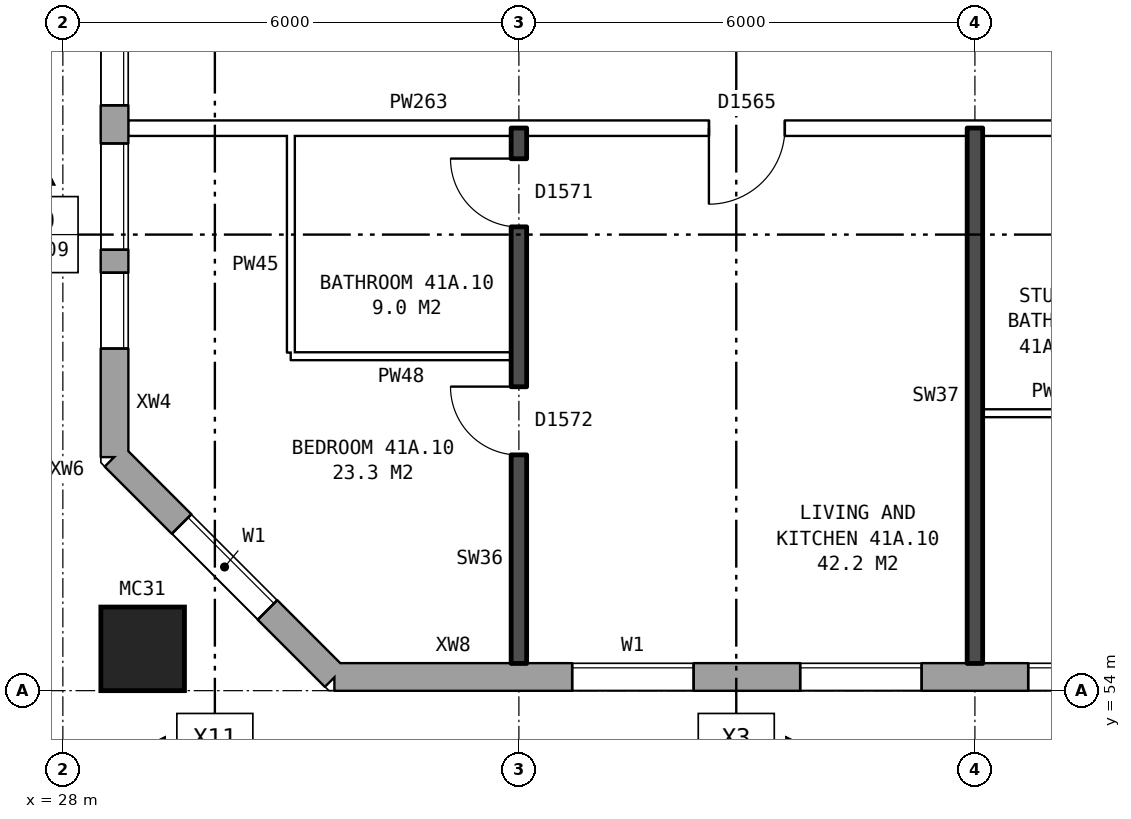
"""IFC4 building model, lengths in metres.
Left out: names, types, materials, properties, quantities, classifications, styles, units other than length and angle.
Written with IfcOpenShell. Run it as: python <this file> out.ifc"""

import sys

from ifc_helpers import new_model, si_unit, direction, frame, frame_2d, origin, origin_2d, place, context, subcontext, project, spatial, rectangle, hollow_rectangle, extrude, element, fill, save


model = new_model("IFC4")
c1 = context("Model", 3, precision=1e-05, world=origin(), true_north=direction((0.0, 1.0)))
c2 = subcontext(c1, "Body", "Model", "MODEL_VIEW")
j1 = project(units=[si_unit("LENGTHUNIT", "METRE"), si_unit("PLANEANGLEUNIT", "RADIAN")], contexts=[c1])
p1 = place(None, origin())
s1 = spatial("IfcSite", under=j1, at=p1, CompositionType="ELEMENT")
p2 = place(p1, origin())
s2 = spatial("IfcBuilding", under=s1, at=p2, CompositionType="ELEMENT")
p3 = place(p2, frame((0.0, 0.0, 148.5)))
s3 = spatial("IfcBuildingStorey", under=s2, at=p3, CompositionType="ELEMENT", Elevation=148.5)
p4 = place(p3, frame((29.05, 54.55, 0.0), z_axis=(0.0, 0.0, 1.0), x_axis=(1.0, 0.0, 0.0)))
e1 = element("IfcColumn", 1, at=p4, inside=s3, PredefinedType="COLUMN", context=c2, shape_type="SweptSolid", body=[
    extrude(hollow_rectangle(XDim=1.1, YDim=1.1, WallThickness=0.06, at=origin_2d()), origin(), (0.0, 0.0, 1.0), 3.1),
])
p5 = place(p3, frame((28.68, 57.075, 0.0), z_axis=(0.0, 0.0, 1.0), x_axis=(0.707106781187, -0.707106781187, 0.0)))
e2 = element("IfcWall", 2, at=p5, inside=s3, PredefinedType="STANDARD", context=c2, shape_type="SweptSolid", body=[
    extrude(rectangle(XDim=4.094, YDim=0.36, at=frame_2d((2.047, 0.0))), origin(), (0.0, 0.0, 1.0), 2.85),
])
p6 = place(p5, frame((1.247, 0.0, 0.8)))
e3 = element("IfcOpeningElement", 3, at=p6, cuts=e2, PredefinedType="OPENING", context=c2, shape_type="SweptSolid", body=[
    extrude(rectangle(XDim=1.6, YDim=1.8, at=frame_2d((0.8, 0.9))), frame((0.0, 0.19, 0.0), z_axis=(0.0, -1.0, 0.0), x_axis=(1.0, 0.0, 0.0)), (0.0, 0.0, 1.0), 0.38),
])
p7 = place(p3, frame((31.575, 54.18, 0.0), z_axis=(0.0, 0.0, 1.0), x_axis=(1.0, 0.0, 0.0)))
e4 = element("IfcWall", 4, at=p7, inside=s3, PredefinedType="STANDARD", context=c2, shape_type="SweptSolid", body=[
    extrude(rectangle(XDim=41.351, YDim=0.36, at=frame_2d((20.675, 0.0))), origin(), (0.0, 0.0, 1.0), 2.85),
])
p8 = place(p7, frame((3.125, 0.0, 0.8)))
e5 = element("IfcOpeningElement", 5, at=p8, cuts=e4, PredefinedType="OPENING", context=c2, shape_type="SweptSolid", body=[
    extrude(rectangle(XDim=1.6, YDim=1.8, at=frame_2d((0.8, 0.9))), frame((0.0, 0.19, 0.0), z_axis=(0.0, -1.0, 0.0), x_axis=(1.0, 0.0, 0.0)), (0.0, 0.0, 1.0), 0.38),
])
p9 = place(p7, frame((6.125, 0.0, 0.8)))
e6 = element("IfcOpeningElement", 6, at=p9, cuts=e4, PredefinedType="OPENING", context=c2, shape_type="SweptSolid", body=[
    extrude(rectangle(XDim=1.6, YDim=1.8, at=frame_2d((0.8, 0.9))), frame((0.0, 0.19, 0.0), z_axis=(0.0, -1.0, 0.0), x_axis=(1.0, 0.0, 0.0)), (0.0, 0.0, 1.0), 0.38),
])
p10 = place(p7, frame((9.125, 0.0, 0.8)))
e7 = element("IfcOpeningElement", 7, at=p10, cuts=e4, PredefinedType="OPENING", context=c2, shape_type="SweptSolid", body=[
    extrude(rectangle(XDim=1.6, YDim=1.8, at=frame_2d((0.8, 0.9))), frame((0.0, 0.19, 0.0), z_axis=(0.0, -1.0, 0.0), x_axis=(1.0, 0.0, 0.0)), (0.0, 0.0, 1.0), 0.38),
])
p11 = place(p7, frame((12.125, 0.0, 0.8)))
e8 = element("IfcOpeningElement", 8, at=p11, cuts=e4, PredefinedType="OPENING", context=c2, shape_type="SweptSolid", body=[
    extrude(rectangle(XDim=1.6, YDim=1.8, at=frame_2d((0.8, 0.9))), frame((0.0, 0.19, 0.0), z_axis=(0.0, -1.0, 0.0), x_axis=(1.0, 0.0, 0.0)), (0.0, 0.0, 1.0), 0.38),
])
p12 = place(p7, frame((15.125, 0.0, 0.8)))
e9 = element("IfcOpeningElement", 9, at=p12, cuts=e4, PredefinedType="OPENING", context=c2, shape_type="SweptSolid", body=[
    extrude(rectangle(XDim=1.6, YDim=1.8, at=frame_2d((0.8, 0.9))), frame((0.0, 0.19, 0.0), z_axis=(0.0, -1.0, 0.0), x_axis=(1.0, 0.0, 0.0)), (0.0, 0.0, 1.0), 0.38),
])
p13 = place(p7, frame((18.125, 0.0, 0.8)))
e10 = element("IfcOpeningElement", 10, at=p13, cuts=e4, PredefinedType="OPENING", context=c2, shape_type="SweptSolid", body=[
    extrude(rectangle(XDim=1.6, YDim=1.8, at=frame_2d((0.8, 0.9))), frame((0.0, 0.19, 0.0), z_axis=(0.0, -1.0, 0.0), x_axis=(1.0, 0.0, 0.0)), (0.0, 0.0, 1.0), 0.38),
])
p14 = place(p7, frame((21.125, 0.0, 0.8)))
e11 = element("IfcOpeningElement", 11, at=p14, cuts=e4, PredefinedType="OPENING", context=c2, shape_type="SweptSolid", body=[
    extrude(rectangle(XDim=1.6, YDim=1.8, at=frame_2d((0.8, 0.9))), frame((0.0, 0.19, 0.0), z_axis=(0.0, -1.0, 0.0), x_axis=(1.0, 0.0, 0.0)), (0.0, 0.0, 1.0), 0.38),
])
p15 = place(p7, frame((24.125, 0.0, 0.8)))
e12 = element("IfcOpeningElement", 12, at=p15, cuts=e4, PredefinedType="OPENING", context=c2, shape_type="SweptSolid", body=[
    extrude(rectangle(XDim=1.6, YDim=1.8, at=frame_2d((0.8, 0.9))), frame((0.0, 0.19, 0.0), z_axis=(0.0, -1.0, 0.0), x_axis=(1.0, 0.0, 0.0)), (0.0, 0.0, 1.0), 0.38),
])
p16 = place(p7, frame((27.125, 0.0, 0.8)))
e13 = element("IfcOpeningElement", 13, at=p16, cuts=e4, PredefinedType="OPENING", context=c2, shape_type="SweptSolid", body=[
    extrude(rectangle(XDim=1.6, YDim=1.8, at=frame_2d((0.8, 0.9))), frame((0.0, 0.19, 0.0), z_axis=(0.0, -1.0, 0.0), x_axis=(1.0, 0.0, 0.0)), (0.0, 0.0, 1.0), 0.38),
])
p17 = place(p7, frame((30.125, 0.0, 0.8)))
e14 = element("IfcOpeningElement", 14, at=p17, cuts=e4, PredefinedType="OPENING", context=c2, shape_type="SweptSolid", body=[
    extrude(rectangle(XDim=1.6, YDim=1.8, at=frame_2d((0.8, 0.9))), frame((0.0, 0.19, 0.0), z_axis=(0.0, -1.0, 0.0), x_axis=(1.0, 0.0, 0.0)), (0.0, 0.0, 1.0), 0.38),
])
p18 = place(p7, frame((33.125, 0.0, 0.8)))
e15 = element("IfcOpeningElement", 15, at=p18, cuts=e4, PredefinedType="OPENING", context=c2, shape_type="SweptSolid", body=[
    extrude(rectangle(XDim=1.6, YDim=1.8, at=frame_2d((0.8, 0.9))), frame((0.0, 0.19, 0.0), z_axis=(0.0, -1.0, 0.0), x_axis=(1.0, 0.0, 0.0)), (0.0, 0.0, 1.0), 0.38),
])
p19 = place(p7, frame((36.125, 0.0, 0.8)))
e16 = element("IfcOpeningElement", 16, at=p19, cuts=e4, PredefinedType="OPENING", context=c2, shape_type="SweptSolid", body=[
    extrude(rectangle(XDim=1.6, YDim=1.8, at=frame_2d((0.8, 0.9))), frame((0.0, 0.19, 0.0), z_axis=(0.0, -1.0, 0.0), x_axis=(1.0, 0.0, 0.0)), (0.0, 0.0, 1.0), 0.38),
])
p20 = place(p7, frame((38.625, 0.0, 0.8)))
e17 = element("IfcOpeningElement", 17, at=p20, cuts=e4, PredefinedType="OPENING", context=c2, shape_type="SweptSolid", body=[
    extrude(rectangle(XDim=1.2, YDim=1.8, at=frame_2d((0.6, 0.9))), frame((0.0, 0.19, 0.0), z_axis=(0.0, -1.0, 0.0), x_axis=(1.0, 0.0, 0.0)), (0.0, 0.0, 1.0), 0.38),
])
p21 = place(p7, frame((40.125, 0.0, 0.8)))
e18 = element("IfcOpeningElement", 18, at=p21, cuts=e4, PredefinedType="OPENING", context=c2, shape_type="SweptSolid", body=[
    extrude(rectangle(XDim=0.8, YDim=0.9, at=frame_2d((0.4, 0.45))), frame((0.0, 0.19, 0.0), z_axis=(0.0, -1.0, 0.0), x_axis=(1.0, 0.0, 0.0)), (0.0, 0.0, 1.0), 0.38),
])
p22 = place(p3, frame((28.68, 82.925, 0.0), z_axis=(0.0, 0.0, 1.0), x_axis=(0.0, -1.0, 0.0)))
e19 = element("IfcWall", 19, at=p22, inside=s3, PredefinedType="STANDARD", context=c2, shape_type="SweptSolid", body=[
    extrude(rectangle(XDim=25.851, YDim=0.36, at=frame_2d((12.925, 0.0))), origin(), (0.0, 0.0, 1.0), 2.85),
])
p23 = place(p22, frame((1.4, 0.0, 0.8)))
e20 = element("IfcOpeningElement", 20, at=p23, cuts=e19, PredefinedType="OPENING", context=c2, shape_type="SweptSolid", body=[
    extrude(rectangle(XDim=1.0, YDim=1.2, at=frame_2d((0.5, 0.6))), frame((0.0, 0.19, 0.0), z_axis=(0.0, -1.0, 0.0), x_axis=(1.0, 0.0, 0.0)), (0.0, 0.0, 1.0), 0.38),
])
p24 = place(p22, frame((4.625, 0.0, 0.8)))
e21 = element("IfcOpeningElement", 21, at=p24, cuts=e19, PredefinedType="OPENING", context=c2, shape_type="SweptSolid", body=[
    extrude(rectangle(XDim=1.6, YDim=1.8, at=frame_2d((0.8, 0.9))), frame((0.0, 0.19, 0.0), z_axis=(0.0, -1.0, 0.0), x_axis=(1.0, 0.0, 0.0)), (0.0, 0.0, 1.0), 0.38),
])
p25 = place(p22, frame((7.625, 0.0, 0.8)))
e22 = element("IfcOpeningElement", 22, at=p25, cuts=e19, PredefinedType="OPENING", context=c2, shape_type="SweptSolid", body=[
    extrude(rectangle(XDim=1.6, YDim=1.8, at=frame_2d((0.8, 0.9))), frame((0.0, 0.19, 0.0), z_axis=(0.0, -1.0, 0.0), x_axis=(1.0, 0.0, 0.0)), (0.0, 0.0, 1.0), 0.38),
])
p26 = place(p22, frame((10.625, 0.0, 0.8)))
e23 = element("IfcOpeningElement", 23, at=p26, cuts=e19, PredefinedType="OPENING", context=c2, shape_type="SweptSolid", body=[
    extrude(rectangle(XDim=1.6, YDim=1.8, at=frame_2d((0.8, 0.9))), frame((0.0, 0.19, 0.0), z_axis=(0.0, -1.0, 0.0), x_axis=(1.0, 0.0, 0.0)), (0.0, 0.0, 1.0), 0.38),
])
p27 = place(p22, frame((13.625, 0.0, 0.8)))
e24 = element("IfcOpeningElement", 24, at=p27, cuts=e19, PredefinedType="OPENING", context=c2, shape_type="SweptSolid", body=[
    extrude(rectangle(XDim=1.6, YDim=1.8, at=frame_2d((0.8, 0.9))), frame((0.0, 0.19, 0.0), z_axis=(0.0, -1.0, 0.0), x_axis=(1.0, 0.0, 0.0)), (0.0, 0.0, 1.0), 0.38),
])
p28 = place(p22, frame((16.625, 0.0, 0.8)))
e25 = element("IfcOpeningElement", 25, at=p28, cuts=e19, PredefinedType="OPENING", context=c2, shape_type="SweptSolid", body=[
    extrude(rectangle(XDim=1.6, YDim=1.8, at=frame_2d((0.8, 0.9))), frame((0.0, 0.19, 0.0), z_axis=(0.0, -1.0, 0.0), x_axis=(1.0, 0.0, 0.0)), (0.0, 0.0, 1.0), 0.38),
])
p29 = place(p22, frame((19.625, 0.0, 0.8)))
e26 = element("IfcOpeningElement", 26, at=p29, cuts=e19, PredefinedType="OPENING", context=c2, shape_type="SweptSolid", body=[
    extrude(rectangle(XDim=1.6, YDim=1.8, at=frame_2d((0.8, 0.9))), frame((0.0, 0.19, 0.0), z_axis=(0.0, -1.0, 0.0), x_axis=(1.0, 0.0, 0.0)), (0.0, 0.0, 1.0), 0.38),
])
p30 = place(p22, frame((21.725, 0.0, 0.8)))
e27 = element("IfcOpeningElement", 27, at=p30, cuts=e19, PredefinedType="OPENING", context=c2, shape_type="SweptSolid", body=[
    extrude(rectangle(XDim=1.4, YDim=1.8, at=frame_2d((0.7, 0.9))), frame((0.0, 0.19, 0.0), z_axis=(0.0, -1.0, 0.0), x_axis=(1.0, 0.0, 0.0)), (0.0, 0.0, 1.0), 0.38),
])
p31 = place(p22, frame((2.7, 0.0, 0.8)))
e28 = element("IfcOpeningElement", 28, at=p31, cuts=e19, PredefinedType="OPENING", context=c2, shape_type="SweptSolid", body=[
    extrude(rectangle(XDim=1.4, YDim=1.8, at=frame_2d((0.7, 0.9))), frame((0.0, 0.19, 0.0), z_axis=(0.0, -1.0, 0.0), x_axis=(1.0, 0.0, 0.0)), (0.0, 0.0, 1.0), 0.38),
])
p32 = place(p22, frame((23.425, 0.0, 0.8)))
e29 = element("IfcOpeningElement", 29, at=p32, cuts=e19, PredefinedType="OPENING", context=c2, shape_type="SweptSolid", body=[
    extrude(rectangle(XDim=1.0, YDim=1.2, at=frame_2d((0.5, 0.6))), frame((0.0, 0.19, 0.0), z_axis=(0.0, -1.0, 0.0), x_axis=(1.0, 0.0, 0.0)), (0.0, 0.0, 1.0), 0.38),
])
p33 = place(p3, frame((40.1, 57.65, 0.0), z_axis=(0.0, 0.0, 1.0), x_axis=(1.0, 0.0, 0.0)))
e30 = element("IfcWall", 30, at=p33, inside=s3, PredefinedType="PARTITIONING", context=c2, shape_type="SweptSolid", body=[
    extrude(rectangle(XDim=1.9, YDim=0.1, at=frame_2d((0.95, 0.0))), origin(), (0.0, 0.0, 1.0), 2.85),
])
p34 = place(p3, frame((31.0, 58.4, 0.0), z_axis=(0.0, 0.0, 1.0), x_axis=(1.0, 0.0, 0.0)))
e31 = element("IfcWall", 31, at=p34, inside=s3, PredefinedType="PARTITIONING", context=c2, shape_type="SweptSolid", body=[
    extrude(rectangle(XDim=2.9, YDim=0.1, at=frame_2d((1.45, 0.0))), origin(), (0.0, 0.0, 1.0), 2.85),
])
p35 = place(p3, frame((28.86, 61.4, 0.0), z_axis=(0.0, 0.0, 1.0), x_axis=(1.0, 0.0, 0.0)))
e32 = element("IfcWall", 32, at=p35, inside=s3, PredefinedType="PARTITIONING", context=c2, shape_type="SweptSolid", body=[
    extrude(rectangle(XDim=17.04, YDim=0.2, at=frame_2d((8.52, 0.0))), origin(), (0.0, 0.0, 1.0), 2.85),
])
p36 = place(p35, frame((14.59, 0.0, 0.0)))
e33 = element("IfcOpeningElement", 33, at=p36, cuts=e32, PredefinedType="OPENING", context=c2, shape_type="SweptSolid", body=[
    extrude(rectangle(XDim=1.0, YDim=2.1, at=frame_2d((0.5, 1.05))), frame((0.0, 0.11, 0.0), z_axis=(0.0, -1.0, 0.0), x_axis=(1.0, 0.0, 0.0)), (0.0, 0.0, 1.0), 0.22),
])
p37 = place(p35, frame((7.64, 0.0, 0.0)))
e34 = element("IfcOpeningElement", 34, at=p37, cuts=e32, PredefinedType="OPENING", context=c2, shape_type="SweptSolid", body=[
    extrude(rectangle(XDim=1.0, YDim=2.1, at=frame_2d((0.5, 1.05))), frame((0.0, 0.11, 0.0), z_axis=(0.0, -1.0, 0.0), x_axis=(1.0, 0.0, 0.0)), (0.0, 0.0, 1.0), 0.22),
])
p38 = place(p3, frame((31.0, 58.45, 0.0), z_axis=(0.0, 0.0, 1.0), x_axis=(0.0, 1.0, 0.0)))
e35 = element("IfcWall", 35, at=p38, inside=s3, PredefinedType="PARTITIONING", context=c2, shape_type="SweptSolid", body=[
    extrude(rectangle(XDim=2.85, YDim=0.1, at=frame_2d((1.425, 0.0))), origin(), (0.0, 0.0, 1.0), 2.85),
])
p39 = place(p3, frame((34.0, 54.36, 0.0), z_axis=(0.0, 0.0, 1.0), x_axis=(0.0, 1.0, 0.0)))
e36 = element("IfcWall", 36, at=p39, inside=s3, PredefinedType="SOLIDWALL", context=c2, shape_type="SweptSolid", body=[
    extrude(rectangle(XDim=7.04, YDim=0.2, at=frame_2d((3.52, 0.0))), origin(), (0.0, 0.0, 1.0), 2.85),
])
p40 = place(p39, frame((2.74, 0.0, 0.0)))
e37 = element("IfcOpeningElement", 37, at=p40, cuts=e36, PredefinedType="OPENING", context=c2, shape_type="SweptSolid", body=[
    extrude(rectangle(XDim=0.9, YDim=2.1, at=frame_2d((0.45, 1.05))), frame((0.0, 0.11, 0.0), z_axis=(0.0, -1.0, 0.0), x_axis=(1.0, 0.0, 0.0)), (0.0, 0.0, 1.0), 0.22),
])
p41 = place(p39, frame((5.74, 0.0, 0.0)))
e38 = element("IfcOpeningElement", 38, at=p41, cuts=e36, PredefinedType="OPENING", context=c2, shape_type="SweptSolid", body=[
    extrude(rectangle(XDim=0.9, YDim=2.1, at=frame_2d((0.45, 1.05))), frame((0.0, 0.11, 0.0), z_axis=(0.0, -1.0, 0.0), x_axis=(1.0, 0.0, 0.0)), (0.0, 0.0, 1.0), 0.22),
])
p42 = place(p3, frame((40.0, 54.36, 0.0), z_axis=(0.0, 0.0, 1.0), x_axis=(0.0, 1.0, 0.0)))
e39 = element("IfcWall", 39, at=p42, inside=s3, PredefinedType="SOLIDWALL", context=c2, shape_type="SweptSolid", body=[
    extrude(rectangle(XDim=7.04, YDim=0.2, at=frame_2d((3.52, 0.0))), origin(), (0.0, 0.0, 1.0), 2.85),
])
p43 = place(p6, origin())
e40 = element("IfcWindow", 40, at=p43, inside=s3, PartitioningType="SINGLE_PANEL", PredefinedType="WINDOW", context=c2, shape_type="SweptSolid", body=[
    extrude(rectangle(XDim=1.6, YDim=1.8, at=frame_2d((0.8, 0.9))), frame((0.0, 0.15, 0.0), z_axis=(0.0, -1.0, 0.0), x_axis=(1.0, 0.0, 0.0)), (0.0, 0.0, 1.0), 0.06),
])
fill(e3, e40)
p44 = place(p8, origin())
e41 = element("IfcWindow", 41, at=p44, inside=s3, PartitioningType="SINGLE_PANEL", PredefinedType="WINDOW", context=c2, shape_type="SweptSolid", body=[
    extrude(rectangle(XDim=1.6, YDim=1.8, at=frame_2d((0.8, 0.9))), frame((0.0, 0.15, 0.0), z_axis=(0.0, -1.0, 0.0), x_axis=(1.0, 0.0, 0.0)), (0.0, 0.0, 1.0), 0.06),
])
fill(e5, e41)
p45 = place(p9, origin())
e42 = element("IfcWindow", 42, at=p45, inside=s3, PartitioningType="SINGLE_PANEL", PredefinedType="WINDOW", context=c2, shape_type="SweptSolid", body=[
    extrude(rectangle(XDim=1.6, YDim=1.8, at=frame_2d((0.8, 0.9))), frame((0.0, 0.15, 0.0), z_axis=(0.0, -1.0, 0.0), x_axis=(1.0, 0.0, 0.0)), (0.0, 0.0, 1.0), 0.06),
])
fill(e6, e42)
p46 = place(p10, origin())
e43 = element("IfcWindow", 43, at=p46, inside=s3, PartitioningType="SINGLE_PANEL", PredefinedType="WINDOW", context=c2, shape_type="SweptSolid", body=[
    extrude(rectangle(XDim=1.6, YDim=1.8, at=frame_2d((0.8, 0.9))), frame((0.0, 0.15, 0.0), z_axis=(0.0, -1.0, 0.0), x_axis=(1.0, 0.0, 0.0)), (0.0, 0.0, 1.0), 0.06),
])
fill(e7, e43)
p47 = place(p29, origin())
e44 = element("IfcWindow", 44, at=p47, inside=s3, PartitioningType="SINGLE_PANEL", PredefinedType="WINDOW", context=c2, shape_type="SweptSolid", body=[
    extrude(rectangle(XDim=1.6, YDim=1.8, at=frame_2d((0.8, 0.9))), frame((0.0, 0.15, 0.0), z_axis=(0.0, -1.0, 0.0), x_axis=(1.0, 0.0, 0.0)), (0.0, 0.0, 1.0), 0.06),
])
fill(e26, e44)
p48 = place(p30, origin())
e45 = element("IfcWindow", 45, at=p48, inside=s3, PartitioningType="SINGLE_PANEL", PredefinedType="WINDOW", context=c2, shape_type="SweptSolid", body=[
    extrude(rectangle(XDim=1.4, YDim=1.8, at=frame_2d((0.7, 0.9))), frame((0.0, 0.15, 0.0), z_axis=(0.0, -1.0, 0.0), x_axis=(1.0, 0.0, 0.0)), (0.0, 0.0, 1.0), 0.06),
])
fill(e27, e45)
p49 = place(p40, origin())
e46 = element("IfcDoor", 46, at=p49, inside=s3, OperationType="SINGLE_SWING_RIGHT", PredefinedType="DOOR", context=c2, shape_type="SweptSolid", body=[
    extrude(rectangle(XDim=0.9, YDim=2.1, at=frame_2d((0.45, 1.05))), frame((0.0, 0.025, 0.0), z_axis=(0.0, -1.0, 0.0), x_axis=(1.0, 0.0, 0.0)), (0.0, 0.0, 1.0), 0.05),
])
fill(e37, e46)
p50 = place(p37, frame((1.0, 0.0, 0.0), z_axis=(0.0, 0.0, 1.0), x_axis=(-1.0, 0.0, 0.0)))
e47 = element("IfcDoor", 47, at=p50, inside=s3, OperationType="SINGLE_SWING_RIGHT", PredefinedType="DOOR", context=c2, shape_type="SweptSolid", body=[
    extrude(rectangle(XDim=1.0, YDim=2.1, at=frame_2d((0.5, 1.05))), frame((0.0, 0.025, 0.0), z_axis=(0.0, -1.0, 0.0), x_axis=(1.0, 0.0, 0.0)), (0.0, 0.0, 1.0), 0.05),
])
fill(e34, e47)
p51 = place(p41, origin())
e48 = element("IfcDoor", 48, at=p51, inside=s3, OperationType="SINGLE_SWING_RIGHT", PredefinedType="DOOR", context=c2, shape_type="SweptSolid", body=[
    extrude(rectangle(XDim=0.9, YDim=2.1, at=frame_2d((0.45, 1.05))), frame((0.0, 0.025, 0.0), z_axis=(0.0, -1.0, 0.0), x_axis=(1.0, 0.0, 0.0)), (0.0, 0.0, 1.0), 0.05),
])
fill(e38, e48)
p52 = place(p32, origin())
e49 = element("IfcWindow", 49, at=p52, inside=s3, PartitioningType="SINGLE_PANEL", PredefinedType="WINDOW", context=c2, shape_type="SweptSolid", body=[
    extrude(rectangle(XDim=1.0, YDim=1.2, at=frame_2d((0.5, 0.6))), frame((0.0, 0.15, 0.0), z_axis=(0.0, -1.0, 0.0), x_axis=(1.0, 0.0, 0.0)), (0.0, 0.0, 1.0), 0.06),
])
fill(e29, e49)
save(model, sys.argv[1])
